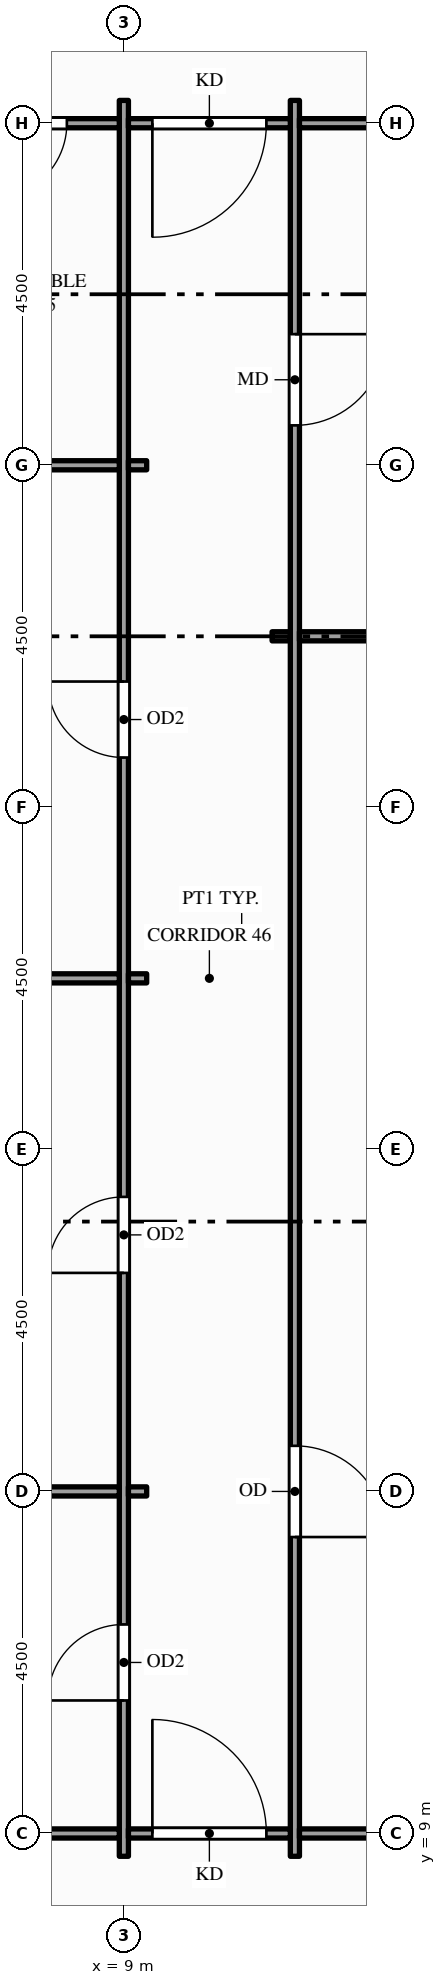
"""IFC4 building model, lengths in metres.
Left out: names, types, materials, properties, quantities, classifications, styles, units other than length and angle.
Written with IfcOpenShell. Run it as: python <this file> out.ifc"""

import sys

from ifc_helpers import new_model, si_unit, direction, frame, frame_2d, origin, place, context, subcontext, project, spatial, rectangle, extrude, element, fill, save


model = new_model("IFC4")
c1 = context("Model", 3, precision=1e-05, world=origin(), true_north=direction((0.0, 1.0)))
c2 = subcontext(c1, "Body", "Model", "MODEL_VIEW")
j1 = project(units=[si_unit("LENGTHUNIT", "METRE"), si_unit("PLANEANGLEUNIT", "RADIAN")], contexts=[c1])
p1 = place(None, origin())
s1 = spatial("IfcSite", under=j1, at=p1, CompositionType="ELEMENT")
p2 = place(p1, origin())
s2 = spatial("IfcBuilding", under=s1, at=p2, CompositionType="ELEMENT")
p3 = place(p2, frame((0.0, 0.0, 223.0)))
s3 = spatial("IfcBuildingStorey", under=s2, at=p3, CompositionType="ELEMENT", Elevation=223.0)
p4 = place(p3, frame((9.0, 8.7, 0.0), z_axis=(0.0, 0.0, 1.0), x_axis=(0.0, 1.0, 0.0)))
e1 = element("IfcWall", 1, at=p4, inside=s3, PredefinedType="PARTITIONING", context=c2, shape_type="SweptSolid", body=[
    extrude(rectangle(XDim=23.1, YDim=0.12, at=frame_2d((11.55, 0.0))), origin(), (0.0, 0.0, 1.0), 2.6),
])
p5 = place(p4, frame((2.05, 0.0, 0.0)))
e2 = element("IfcOpeningElement", 2, at=p5, cuts=e1, PredefinedType="OPENING", context=c2, shape_type="SweptSolid", body=[
    extrude(rectangle(XDim=1.0, YDim=2.1, at=frame_2d((0.5, 1.05))), frame((0.0, 0.07, 0.0), z_axis=(0.0, -1.0, 0.0), x_axis=(1.0, 0.0, 0.0)), (0.0, 0.0, 1.0), 0.14),
])
p6 = place(p4, frame((7.675, 0.0, 0.0)))
e3 = element("IfcOpeningElement", 3, at=p6, cuts=e1, PredefinedType="OPENING", context=c2, shape_type="SweptSolid", body=[
    extrude(rectangle(XDim=1.0, YDim=2.1, at=frame_2d((0.5, 1.05))), frame((0.0, 0.07, 0.0), z_axis=(0.0, -1.0, 0.0), x_axis=(1.0, 0.0, 0.0)), (0.0, 0.0, 1.0), 0.14),
])
p7 = place(p4, frame((14.455, 0.0, 0.0)))
e4 = element("IfcOpeningElement", 4, at=p7, cuts=e1, PredefinedType="OPENING", context=c2, shape_type="SweptSolid", body=[
    extrude(rectangle(XDim=1.0, YDim=2.1, at=frame_2d((0.5, 1.05))), frame((0.0, 0.07, 0.0), z_axis=(0.0, -1.0, 0.0), x_axis=(1.0, 0.0, 0.0)), (0.0, 0.0, 1.0), 0.14),
])
p8 = place(p3, frame((11.25, 8.7, 0.0), z_axis=(0.0, 0.0, 1.0), x_axis=(0.0, 1.0, 0.0)))
e5 = element("IfcWall", 5, at=p8, inside=s3, PredefinedType="PARTITIONING", context=c2, shape_type="SweptSolid", body=[
    extrude(rectangle(XDim=23.1, YDim=0.12, at=frame_2d((11.55, 0.0))), origin(), (0.0, 0.0, 1.0), 2.6),
])
p9 = place(p8, frame((18.825, 0.0, 0.0)))
e6 = element("IfcOpeningElement", 6, at=p9, cuts=e5, PredefinedType="OPENING", context=c2, shape_type="SweptSolid", body=[
    extrude(rectangle(XDim=1.2, YDim=2.1, at=frame_2d((0.6, 1.05))), frame((0.0, 0.07, 0.0), z_axis=(0.0, -1.0, 0.0), x_axis=(1.0, 0.0, 0.0)), (0.0, 0.0, 1.0), 0.14),
])
p10 = place(p8, frame((4.2, 0.0, 0.0)))
e7 = element("IfcOpeningElement", 7, at=p10, cuts=e5, PredefinedType="OPENING", context=c2, shape_type="SweptSolid", body=[
    extrude(rectangle(XDim=1.2, YDim=2.1, at=frame_2d((0.6, 1.05))), frame((0.0, 0.07, 0.0), z_axis=(0.0, -1.0, 0.0), x_axis=(1.0, 0.0, 0.0)), (0.0, 0.0, 1.0), 0.14),
])
p11 = place(p3, frame((0.15, 9.0, 0.0), z_axis=(0.0, 0.0, 1.0), x_axis=(1.0, 0.0, 0.0)))
e8 = element("IfcWall", 8, at=p11, inside=s3, PredefinedType="PARTITIONING", context=c2, shape_type="SweptSolid", body=[
    extrude(rectangle(XDim=8.79, YDim=0.12, at=frame_2d((4.395, 0.0))), origin(), (0.0, 0.0, 1.0), 2.87),
])
p12 = place(p3, frame((9.06, 9.0, 0.0), z_axis=(0.0, 0.0, 1.0), x_axis=(1.0, 0.0, 0.0)))
e9 = element("IfcWall", 9, at=p12, inside=s3, PredefinedType="PARTITIONING", context=c2, shape_type="SweptSolid", body=[
    extrude(rectangle(XDim=2.13, YDim=0.12, at=frame_2d((1.065, 0.0))), origin(), (0.0, 0.0, 1.0), 2.87),
])
p13 = place(p12, frame((0.315, 0.0, 0.0)))
e10 = element("IfcOpeningElement", 10, at=p13, cuts=e9, PredefinedType="OPENING", context=c2, shape_type="SweptSolid", body=[
    extrude(rectangle(XDim=1.5, YDim=2.1, at=frame_2d((0.75, 1.05))), frame((0.0, 0.07, 0.0), z_axis=(0.0, -1.0, 0.0), x_axis=(1.0, 0.0, 0.0)), (0.0, 0.0, 1.0), 0.14),
])
p14 = place(p3, frame((11.31, 9.0, 0.0), z_axis=(0.0, 0.0, 1.0), x_axis=(1.0, 0.0, 0.0)))
e11 = element("IfcWall", 11, at=p14, inside=s3, PredefinedType="PARTITIONING", context=c2, shape_type="SweptSolid", body=[
    extrude(rectangle(XDim=13.38, YDim=0.12, at=frame_2d((6.69, 0.0))), origin(), (0.0, 0.0, 1.0), 2.76),
])
p15 = place(p14, frame((3.54, 0.0, 0.0)))
e12 = element("IfcOpeningElement", 12, at=p15, cuts=e11, PredefinedType="OPENING", context=c2, shape_type="SweptSolid", body=[
    extrude(rectangle(XDim=1.8, YDim=2.1, at=frame_2d((0.9, 1.05))), frame((0.0, 0.07, 0.0), z_axis=(0.0, -1.0, 0.0), x_axis=(1.0, 0.0, 0.0)), (0.0, 0.0, 1.0), 0.14),
])
p16 = place(p3, frame((0.15, 13.5, 0.0), z_axis=(0.0, 0.0, 1.0), x_axis=(1.0, 0.0, 0.0)))
e13 = element("IfcWall", 13, at=p16, inside=s3, PredefinedType="PARTITIONING", context=c2, shape_type="SweptSolid", body=[
    extrude(rectangle(XDim=8.79, YDim=0.12, at=frame_2d((4.395, 0.0))), origin(), (0.0, 0.0, 1.0), 2.87),
])
p17 = place(p3, frame((9.06, 13.5, 0.0), z_axis=(0.0, 0.0, 1.0), x_axis=(1.0, 0.0, 0.0)))
e14 = element("IfcWall", 14, at=p17, inside=s3, PredefinedType="PARTITIONING", context=c2, shape_type="SweptSolid", body=[
    extrude(rectangle(XDim=0.24, YDim=0.12, at=frame_2d((0.12, 0.0))), origin(), (0.0, 0.0, 1.0), 2.87),
])
p18 = place(p3, frame((0.15, 20.25, 0.0), z_axis=(0.0, 0.0, 1.0), x_axis=(1.0, 0.0, 0.0)))
e15 = element("IfcWall", 15, at=p18, inside=s3, PredefinedType="PARTITIONING", context=c2, shape_type="SweptSolid", body=[
    extrude(rectangle(XDim=8.79, YDim=0.12, at=frame_2d((4.395, 0.0))), origin(), (0.0, 0.0, 1.0), 2.87),
])
for number, where, z_axis, x_axis in (
    (16, (9.06, 20.25, 0.0), (0.0, 0.0, 1.0), (1.0, 0.0, 0.0)),
    (17, (10.95, 24.75, 0.0), (0.0, 0.0, 1.0), (1.0, 0.0, 0.0)),
):
    element("IfcWall", number, at=place(p3, frame(where, z_axis=z_axis, x_axis=x_axis)), inside=s3, PredefinedType="PARTITIONING", context=c2, shape_type="SweptSolid", body=[
        extrude(rectangle(XDim=0.24, YDim=0.12, at=frame_2d((0.12, 0.0))), origin(), (0.0, 0.0, 1.0), 2.87),
    ])
p19 = place(p3, frame((11.31, 24.75, 0.0), z_axis=(0.0, 0.0, 1.0), x_axis=(1.0, 0.0, 0.0)))
e18 = element("IfcWall", 18, at=p19, inside=s3, PredefinedType="PARTITIONING", context=c2, shape_type="SweptSolid", body=[
    extrude(rectangle(XDim=12.637, YDim=0.12, at=frame_2d((6.319, 0.0))), origin(), (0.0, 0.0, 1.0), 2.87),
])
p20 = place(p3, frame((6.56, 27.0, 0.0), z_axis=(0.0, 0.0, 1.0), x_axis=(1.0, 0.0, 0.0)))
e19 = element("IfcWall", 19, at=p20, inside=s3, PredefinedType="PARTITIONING", context=c2, shape_type="SweptSolid", body=[
    extrude(rectangle(XDim=2.38, YDim=0.12, at=frame_2d((1.19, 0.0))), origin(), (0.0, 0.0, 1.0), 2.87),
])
p21 = place(p3, frame((9.06, 27.0, 0.0), z_axis=(0.0, 0.0, 1.0), x_axis=(1.0, 0.0, 0.0)))
e20 = element("IfcWall", 20, at=p21, inside=s3, PredefinedType="PARTITIONING", context=c2, shape_type="SweptSolid", body=[
    extrude(rectangle(XDim=0.24, YDim=0.12, at=frame_2d((0.12, 0.0))), origin(), (0.0, 0.0, 1.0), 2.87),
])
p22 = place(p3, frame((6.56, 31.5, 0.0), z_axis=(0.0, 0.0, 1.0), x_axis=(1.0, 0.0, 0.0)))
e21 = element("IfcWall", 21, at=p22, inside=s3, PredefinedType="PARTITIONING", context=c2, shape_type="SweptSolid", body=[
    extrude(rectangle(XDim=2.38, YDim=0.12, at=frame_2d((1.19, 0.0))), origin(), (0.0, 0.0, 1.0), 2.87),
])
p23 = place(p22, frame((0.69, 0.0, 0.0)))
e22 = element("IfcOpeningElement", 22, at=p23, cuts=e21, PredefinedType="OPENING", context=c2, shape_type="SweptSolid", body=[
    extrude(rectangle(XDim=1.0, YDim=2.1, at=frame_2d((0.5, 1.05))), frame((0.0, 0.07, 0.0), z_axis=(0.0, -1.0, 0.0), x_axis=(1.0, 0.0, 0.0)), (0.0, 0.0, 1.0), 0.14),
])
p24 = place(p3, frame((9.06, 31.5, 0.0), z_axis=(0.0, 0.0, 1.0), x_axis=(1.0, 0.0, 0.0)))
e23 = element("IfcWall", 23, at=p24, inside=s3, PredefinedType="PARTITIONING", context=c2, shape_type="SweptSolid", body=[
    extrude(rectangle(XDim=2.13, YDim=0.12, at=frame_2d((1.065, 0.0))), origin(), (0.0, 0.0, 1.0), 2.87),
])
p25 = place(p24, frame((0.315, 0.0, 0.0)))
e24 = element("IfcOpeningElement", 24, at=p25, cuts=e23, PredefinedType="OPENING", context=c2, shape_type="SweptSolid", body=[
    extrude(rectangle(XDim=1.5, YDim=2.1, at=frame_2d((0.75, 1.05))), frame((0.0, 0.07, 0.0), z_axis=(0.0, -1.0, 0.0), x_axis=(1.0, 0.0, 0.0)), (0.0, 0.0, 1.0), 0.14),
])
p26 = place(p3, frame((11.31, 31.5, 0.0), z_axis=(0.0, 0.0, 1.0), x_axis=(1.0, 0.0, 0.0)))
e25 = element("IfcWall", 25, at=p26, inside=s3, PredefinedType="PARTITIONING", context=c2, shape_type="SweptSolid", body=[
    extrude(rectangle(XDim=12.54, YDim=0.12, at=frame_2d((6.27, 0.0))), origin(), (0.0, 0.0, 1.0), 2.87),
])
p27 = place(p13, origin())
e26 = element("IfcDoor", 26, at=p27, inside=s3, OperationType="SINGLE_SWING_LEFT", PredefinedType="DOOR", context=c2, shape_type="SweptSolid", body=[
    extrude(rectangle(XDim=1.5, YDim=2.1, at=frame_2d((0.75, 1.05))), frame((0.0, 0.025, 0.0), z_axis=(0.0, -1.0, 0.0), x_axis=(1.0, 0.0, 0.0)), (0.0, 0.0, 1.0), 0.05),
])
fill(e10, e26)
p28 = place(p25, origin())
e27 = element("IfcDoor", 27, at=p28, inside=s3, OperationType="SINGLE_SWING_LEFT", PredefinedType="DOOR", context=c2, shape_type="SweptSolid", body=[
    extrude(rectangle(XDim=1.5, YDim=2.1, at=frame_2d((0.75, 1.05))), frame((0.0, 0.025, 0.0), z_axis=(0.0, -1.0, 0.0), x_axis=(1.0, 0.0, 0.0)), (0.0, 0.0, 1.0), 0.05),
])
fill(e24, e27)
p29 = place(p5, origin())
e28 = element("IfcDoor", 28, at=p29, inside=s3, OperationType="SINGLE_SWING_LEFT", PredefinedType="DOOR", context=c2, shape_type="SweptSolid", body=[
    extrude(rectangle(XDim=1.0, YDim=2.1, at=frame_2d((0.5, 1.05))), frame((0.0, 0.025, 0.0), z_axis=(0.0, -1.0, 0.0), x_axis=(1.0, 0.0, 0.0)), (0.0, 0.0, 1.0), 0.05),
])
fill(e2, e28)
p30 = place(p6, origin())
e29 = element("IfcDoor", 29, at=p30, inside=s3, OperationType="SINGLE_SWING_LEFT", PredefinedType="DOOR", context=c2, shape_type="SweptSolid", body=[
    extrude(rectangle(XDim=1.0, YDim=2.1, at=frame_2d((0.5, 1.05))), frame((0.0, 0.025, 0.0), z_axis=(0.0, -1.0, 0.0), x_axis=(1.0, 0.0, 0.0)), (0.0, 0.0, 1.0), 0.05),
])
fill(e3, e29)
p31 = place(p7, origin())
e30 = element("IfcDoor", 30, at=p31, inside=s3, OperationType="SINGLE_SWING_RIGHT", PredefinedType="DOOR", context=c2, shape_type="SweptSolid", body=[
    extrude(rectangle(XDim=1.0, YDim=2.1, at=frame_2d((0.5, 1.05))), frame((0.0, 0.025, 0.0), z_axis=(0.0, -1.0, 0.0), x_axis=(1.0, 0.0, 0.0)), (0.0, 0.0, 1.0), 0.05),
])
fill(e4, e30)
p32 = place(p23, origin())
e31 = element("IfcDoor", 31, at=p32, inside=s3, OperationType="SINGLE_SWING_LEFT", PredefinedType="DOOR", context=c2, shape_type="SweptSolid", body=[
    extrude(rectangle(XDim=1.0, YDim=2.1, at=frame_2d((0.5, 1.05))), frame((0.0, 0.025, 0.0), z_axis=(0.0, -1.0, 0.0), x_axis=(1.0, 0.0, 0.0)), (0.0, 0.0, 1.0), 0.05),
])
fill(e22, e31)
p33 = place(p9, origin())
e32 = element("IfcDoor", 32, at=p33, inside=s3, OperationType="SINGLE_SWING_RIGHT", PredefinedType="DOOR", context=c2, shape_type="SweptSolid", body=[
    extrude(rectangle(XDim=1.2, YDim=2.1, at=frame_2d((0.6, 1.05))), frame((0.0, 0.025, 0.0), z_axis=(0.0, -1.0, 0.0), x_axis=(1.0, 0.0, 0.0)), (0.0, 0.0, 1.0), 0.05),
])
fill(e6, e32)
p34 = place(p10, origin())
e33 = element("IfcDoor", 33, at=p34, inside=s3, OperationType="SINGLE_SWING_LEFT", PredefinedType="DOOR", context=c2, shape_type="SweptSolid", body=[
    extrude(rectangle(XDim=1.2, YDim=2.1, at=frame_2d((0.6, 1.05))), frame((0.0, 0.025, 0.0), z_axis=(0.0, -1.0, 0.0), x_axis=(1.0, 0.0, 0.0)), (0.0, 0.0, 1.0), 0.05),
])
fill(e7, e33)
save(model, sys.argv[1])
